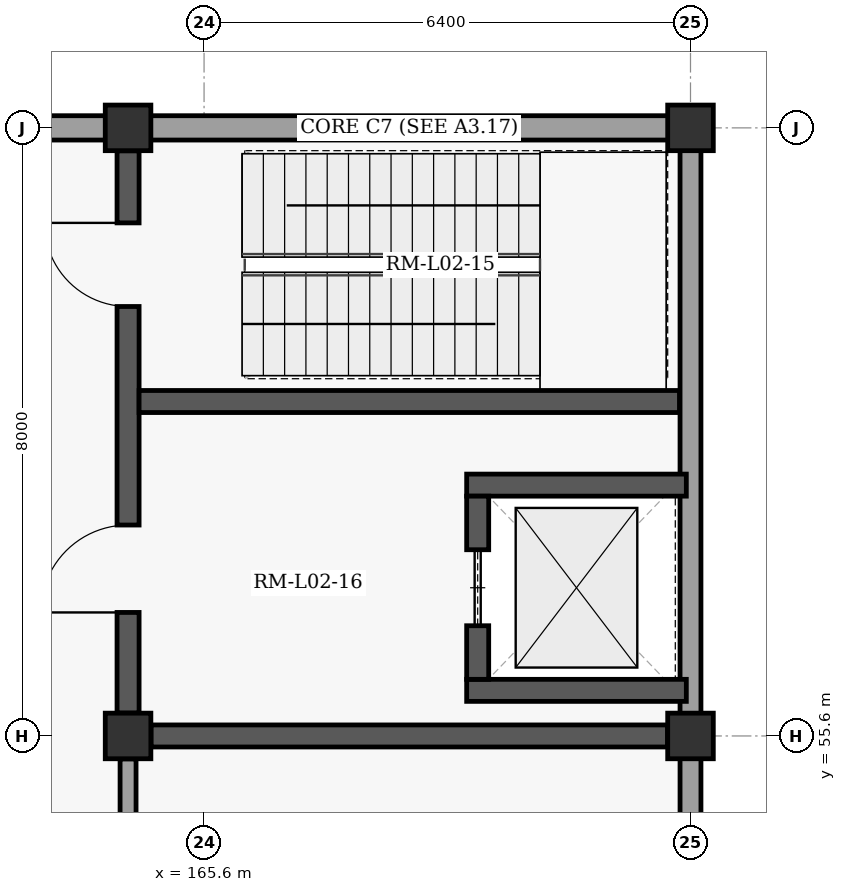
"""IFC4 building model, lengths in metres.
Left out: names, types, materials, properties, quantities, classifications, styles, units other than length and angle.
Written with IfcOpenShell. Run it as: python <this file> out.ifc"""

import sys

from ifc_helpers import new_model, si_unit, direction, frame, frame_2d, origin, origin_2d, place, context, subcontext, project, spatial, rectangle, extrude, element, fill, save


model = new_model("IFC4")
c1 = context("Model", 3, precision=1e-05, world=origin(), true_north=direction((0.0, 1.0)))
c2 = subcontext(c1, "Body", "Model", "MODEL_VIEW")
j1 = project(units=[si_unit("LENGTHUNIT", "METRE"), si_unit("PLANEANGLEUNIT", "RADIAN")], contexts=[c1])
p1 = place(None, origin())
s1 = spatial("IfcSite", under=j1, at=p1, CompositionType="ELEMENT")
p2 = place(p1, origin())
s2 = spatial("IfcBuilding", under=s1, at=p2, CompositionType="ELEMENT")
p3 = place(p2, frame((0.0, 0.0, 10.2)))
s3 = spatial("IfcBuildingStorey", under=s2, at=p3, CompositionType="ELEMENT", Elevation=10.2)
for number, where, z_axis, x_axis in (
    (1, (164.6, 55.6, 0.0), (0.0, 0.0, 1.0), (1.0, 0.0, 0.0)),
    (2, (164.6, 63.6, 0.0), (0.0, 0.0, 1.0), (1.0, 0.0, 0.0)),
    (3, (172.0, 55.6, 0.0), (0.0, 0.0, 1.0), (1.0, 0.0, 0.0)),
    (4, (172.0, 63.6, 0.0), (0.0, 0.0, 1.0), (1.0, 0.0, 0.0)),
):
    element("IfcColumn", number, at=place(p3, frame(where, z_axis=z_axis, x_axis=x_axis)), inside=s3, PredefinedType="COLUMN", context=c2, shape_type="SweptSolid", body=[
        extrude(rectangle(XDim=0.6, YDim=0.6, at=origin_2d()), origin(), (0.0, 0.0, 1.0), 5.4),
    ])
p4 = place(p3, frame((149.2, 63.6, 0.0), z_axis=(0.0, 0.0, 1.0), x_axis=(1.0, 0.0, 0.0)))
e5 = element("IfcWall", 5, at=p4, inside=s3, PredefinedType="SOLIDWALL", context=c2, shape_type="SweptSolid", body=[
    extrude(rectangle(XDim=22.8, YDim=0.32, at=frame_2d((11.4, 0.0))), origin(), (0.0, 0.0, 1.0), 4.3),
])
p5 = place(p4, frame((0.75, 0.0, 0.9)))
e6 = element("IfcOpeningElement", 6, at=p5, cuts=e5, PredefinedType="OPENING", context=c2, shape_type="SweptSolid", body=[
    extrude(rectangle(XDim=1.6, YDim=1.65, at=frame_2d((0.8, 0.825))), frame((0.0, 0.17, 0.0), z_axis=(0.0, -1.0, 0.0), x_axis=(1.0, 0.0, 0.0)), (0.0, 0.0, 1.0), 0.34),
])
p6 = place(p4, frame((8.6, 0.0, 0.9)))
e7 = element("IfcOpeningElement", 7, at=p6, cuts=e5, PredefinedType="OPENING", context=c2, shape_type="SweptSolid", body=[
    extrude(rectangle(XDim=2.8, YDim=2.4, at=frame_2d((1.4, 1.2))), frame((0.0, 0.17, 0.0), z_axis=(0.0, -1.0, 0.0), x_axis=(1.0, 0.0, 0.0)), (0.0, 0.0, 1.0), 0.34),
])
p7 = place(p4, frame((3.9, 0.0, 0.0)))
e8 = element("IfcOpeningElement", 8, at=p7, cuts=e5, PredefinedType="OPENING", context=c2, shape_type="SweptSolid", body=[
    extrude(rectangle(XDim=1.4, YDim=2.25, at=frame_2d((0.7, 1.125))), frame((0.0, 0.17, 0.0), z_axis=(0.0, -1.0, 0.0), x_axis=(1.0, 0.0, 0.0)), (0.0, 0.0, 1.0), 0.34),
])
p8 = place(p3, frame((172.0, 63.6, 0.0), z_axis=(0.0, 0.0, 1.0), x_axis=(0.0, -1.0, 0.0)))
e9 = element("IfcWall", 9, at=p8, inside=s3, PredefinedType="SOLIDWALL", context=c2, shape_type="SweptSolid", body=[
    extrude(rectangle(XDim=56.0, YDim=0.275, at=frame_2d((28.0, 0.0))), origin(), (0.0, 0.0, 1.0), 4.3),
])
p9 = place(p8, frame((10.933, 0.0, 0.8)))
e10 = element("IfcOpeningElement", 10, at=p9, cuts=e9, PredefinedType="OPENING", context=c2, shape_type="SweptSolid", body=[
    extrude(rectangle(XDim=3.65, YDim=2.9, at=frame_2d((1.825, 1.45))), frame((0.0, 0.147, 0.0), z_axis=(0.0, -1.0, 0.0), x_axis=(1.0, 0.0, 0.0)), (0.0, 0.0, 1.0), 0.295),
])
p10 = place(p8, frame((19.667, 0.0, 0.8)))
e11 = element("IfcOpeningElement", 11, at=p10, cuts=e9, PredefinedType="OPENING", context=c2, shape_type="SweptSolid", body=[
    extrude(rectangle(XDim=1.4, YDim=2.1, at=frame_2d((0.7, 1.05))), frame((0.0, 0.147, 0.0), z_axis=(0.0, -1.0, 0.0), x_axis=(1.0, 0.0, 0.0)), (0.0, 0.0, 1.0), 0.295),
])
p11 = place(p8, frame((28.4, 0.0, 0.8)))
e12 = element("IfcOpeningElement", 12, at=p11, cuts=e9, PredefinedType="OPENING", context=c2, shape_type="SweptSolid", body=[
    extrude(rectangle(XDim=1.5, YDim=2.1, at=frame_2d((0.75, 1.05))), frame((0.0, 0.147, 0.0), z_axis=(0.0, -1.0, 0.0), x_axis=(1.0, 0.0, 0.0)), (0.0, 0.0, 1.0), 0.295),
])
p12 = place(p8, frame((37.133, 0.0, 0.8)))
e13 = element("IfcOpeningElement", 13, at=p12, cuts=e9, PredefinedType="OPENING", context=c2, shape_type="SweptSolid", body=[
    extrude(rectangle(XDim=1.6, YDim=2.1, at=frame_2d((0.8, 1.05))), frame((0.0, 0.147, 0.0), z_axis=(0.0, -1.0, 0.0), x_axis=(1.0, 0.0, 0.0)), (0.0, 0.0, 1.0), 0.295),
])
p13 = place(p8, frame((45.117, 0.0, 0.8)))
e14 = element("IfcOpeningElement", 14, at=p13, cuts=e9, PredefinedType="OPENING", context=c2, shape_type="SweptSolid", body=[
    extrude(rectangle(XDim=1.7, YDim=2.15, at=frame_2d((0.85, 1.075))), frame((0.0, 0.147, 0.0), z_axis=(0.0, -1.0, 0.0), x_axis=(1.0, 0.0, 0.0)), (0.0, 0.0, 1.0), 0.295),
])
p14 = place(p3, frame((164.902, 55.6, 0.0), z_axis=(0.0, 0.0, 1.0), x_axis=(1.0, 0.0, 0.0)))
e15 = element("IfcWall", 15, at=p14, inside=s3, PredefinedType="SHEAR", context=c2, shape_type="SweptSolid", body=[
    extrude(rectangle(XDim=6.796, YDim=0.29, at=frame_2d((3.398, 0.0))), origin(), (0.0, 0.0, 1.0), 5.15),
])
p15 = place(p3, frame((164.6, 55.902, 0.0), z_axis=(0.0, 0.0, 1.0), x_axis=(0.0, 1.0, 0.0)))
e16 = element("IfcWall", 16, at=p15, inside=s3, PredefinedType="SHEAR", context=c2, shape_type="SweptSolid", body=[
    extrude(rectangle(XDim=7.396, YDim=0.29, at=frame_2d((3.698, 0.0))), origin(), (0.0, 0.0, 1.0), 5.15),
])
p16 = place(p15, frame((5.348, 0.0, 0.0)))
e17 = element("IfcOpeningElement", 17, at=p16, cuts=e16, PredefinedType="OPENING", context=c2, shape_type="SweptSolid", body=[
    extrude(rectangle(XDim=1.1, YDim=2.15, at=frame_2d((0.55, 1.075))), frame((0.0, 0.155, 0.0), z_axis=(0.0, -1.0, 0.0), x_axis=(1.0, 0.0, 0.0)), (0.0, 0.0, 1.0), 0.31),
])
p17 = place(p15, frame((1.323, 0.0, 0.0)))
e18 = element("IfcOpeningElement", 18, at=p17, cuts=e16, PredefinedType="OPENING", context=c2, shape_type="SweptSolid", body=[
    extrude(rectangle(XDim=1.15, YDim=2.2, at=frame_2d((0.575, 1.1))), frame((0.0, 0.155, 0.0), z_axis=(0.0, -1.0, 0.0), x_axis=(1.0, 0.0, 0.0)), (0.0, 0.0, 1.0), 0.31),
])
p18 = place(p3, frame((164.745, 60.0, 0.0), z_axis=(0.0, 0.0, 1.0), x_axis=(1.0, 0.0, 0.0)))
e19 = element("IfcWall", 19, at=p18, inside=s3, PredefinedType="SHEAR", context=c2, shape_type="SweptSolid", body=[
    extrude(rectangle(XDim=7.11, YDim=0.29, at=frame_2d((3.555, 0.0))), origin(), (0.0, 0.0, 1.0), 5.15),
])
for number, where, z_axis, x_axis in (
    (20, (169.055, 56.2, 0.0), (0.0, 0.0, 1.0), (1.0, 0.0, 0.0)),
    (21, (169.055, 58.9, 0.0), (0.0, 0.0, 1.0), (1.0, 0.0, 0.0)),
):
    element("IfcWall", number, at=place(p3, frame(where, z_axis=z_axis, x_axis=x_axis)), inside=s3, PredefinedType="SHEAR", context=c2, shape_type="SweptSolid", body=[
        extrude(rectangle(XDim=2.89, YDim=0.29, at=frame_2d((1.445, 0.0))), origin(), (0.0, 0.0, 1.0), 5.15),
    ])
p19 = place(p3, frame((169.2, 56.345, 0.0), z_axis=(0.0, 0.0, 1.0), x_axis=(0.0, 1.0, 0.0)))
e22 = element("IfcWall", 22, at=p19, inside=s3, PredefinedType="SHEAR", context=c2, shape_type="SweptSolid", body=[
    extrude(rectangle(XDim=2.41, YDim=0.29, at=frame_2d((1.205, 0.0))), origin(), (0.0, 0.0, 1.0), 5.15),
])
p20 = place(p19, frame((0.705, 0.0, 0.0)))
e23 = element("IfcOpeningElement", 23, at=p20, cuts=e22, PredefinedType="OPENING", context=c2, shape_type="SweptSolid", body=[
    extrude(rectangle(XDim=1.0, YDim=2.15, at=frame_2d((0.5, 1.075))), frame((0.0, 0.155, 0.0), z_axis=(0.0, -1.0, 0.0), x_axis=(1.0, 0.0, 0.0)), (0.0, 0.0, 1.0), 0.31),
])
p21 = place(p3, frame((164.6, 55.298, 0.0), z_axis=(0.0, 0.0, 1.0), x_axis=(0.0, -1.0, 0.0)))
e24 = element("IfcWall", 24, at=p21, inside=s3, PredefinedType="PARTITIONING", context=c2, shape_type="SweptSolid", body=[
    extrude(rectangle(XDim=47.396, YDim=0.21, at=frame_2d((23.698, 0.0))), origin(), (0.0, 0.0, 1.0), 4.3),
])
p22 = place(p21, frame((24.18, 0.0, 0.0)))
e25 = element("IfcOpeningElement", 25, at=p22, cuts=e24, PredefinedType="OPENING", context=c2, shape_type="SweptSolid", body=[
    extrude(rectangle(XDim=1.02, YDim=2.1, at=frame_2d((0.51, 1.05))), frame((0.0, 0.115, 0.0), z_axis=(0.0, -1.0, 0.0), x_axis=(1.0, 0.0, 0.0)), (0.0, 0.0, 1.0), 0.23),
])
p23 = place(p21, frame((36.269, 0.0, 0.0)))
e26 = element("IfcOpeningElement", 26, at=p23, cuts=e24, PredefinedType="OPENING", context=c2, shape_type="SweptSolid", body=[
    extrude(rectangle(XDim=1.4, YDim=2.25, at=frame_2d((0.7, 1.125))), frame((0.0, 0.115, 0.0), z_axis=(0.0, -1.0, 0.0), x_axis=(1.0, 0.0, 0.0)), (0.0, 0.0, 1.0), 0.23),
])
p24 = place(p16, origin())
e27 = element("IfcDoor", 27, at=p24, inside=s3, OperationType="SINGLE_SWING_RIGHT", PredefinedType="DOOR", context=c2, shape_type="SweptSolid", body=[
    extrude(rectangle(XDim=1.1, YDim=2.15, at=frame_2d((0.55, 1.075))), frame((0.0, 0.025, 0.0), z_axis=(0.0, -1.0, 0.0), x_axis=(1.0, 0.0, 0.0)), (0.0, 0.0, 1.0), 0.05),
])
fill(e17, e27)
p25 = place(p17, origin())
e28 = element("IfcDoor", 28, at=p25, inside=s3, OperationType="SINGLE_SWING_LEFT", PredefinedType="DOOR", context=c2, shape_type="SweptSolid", body=[
    extrude(rectangle(XDim=1.15, YDim=2.2, at=frame_2d((0.575, 1.1))), frame((0.0, 0.025, 0.0), z_axis=(0.0, -1.0, 0.0), x_axis=(1.0, 0.0, 0.0)), (0.0, 0.0, 1.0), 0.05),
])
fill(e18, e28)
p26 = place(p20, origin())
e29 = element("IfcDoor", 29, at=p26, inside=s3, OperationType="SLIDING_TO_LEFT", PredefinedType="DOOR", context=c2, shape_type="SweptSolid", body=[
    extrude(rectangle(XDim=1.0, YDim=2.15, at=frame_2d((0.5, 1.075))), frame((0.0, 0.025, 0.0), z_axis=(0.0, -1.0, 0.0), x_axis=(1.0, 0.0, 0.0)), (0.0, 0.0, 1.0), 0.05),
])
fill(e23, e29)
save(model, sys.argv[1])
